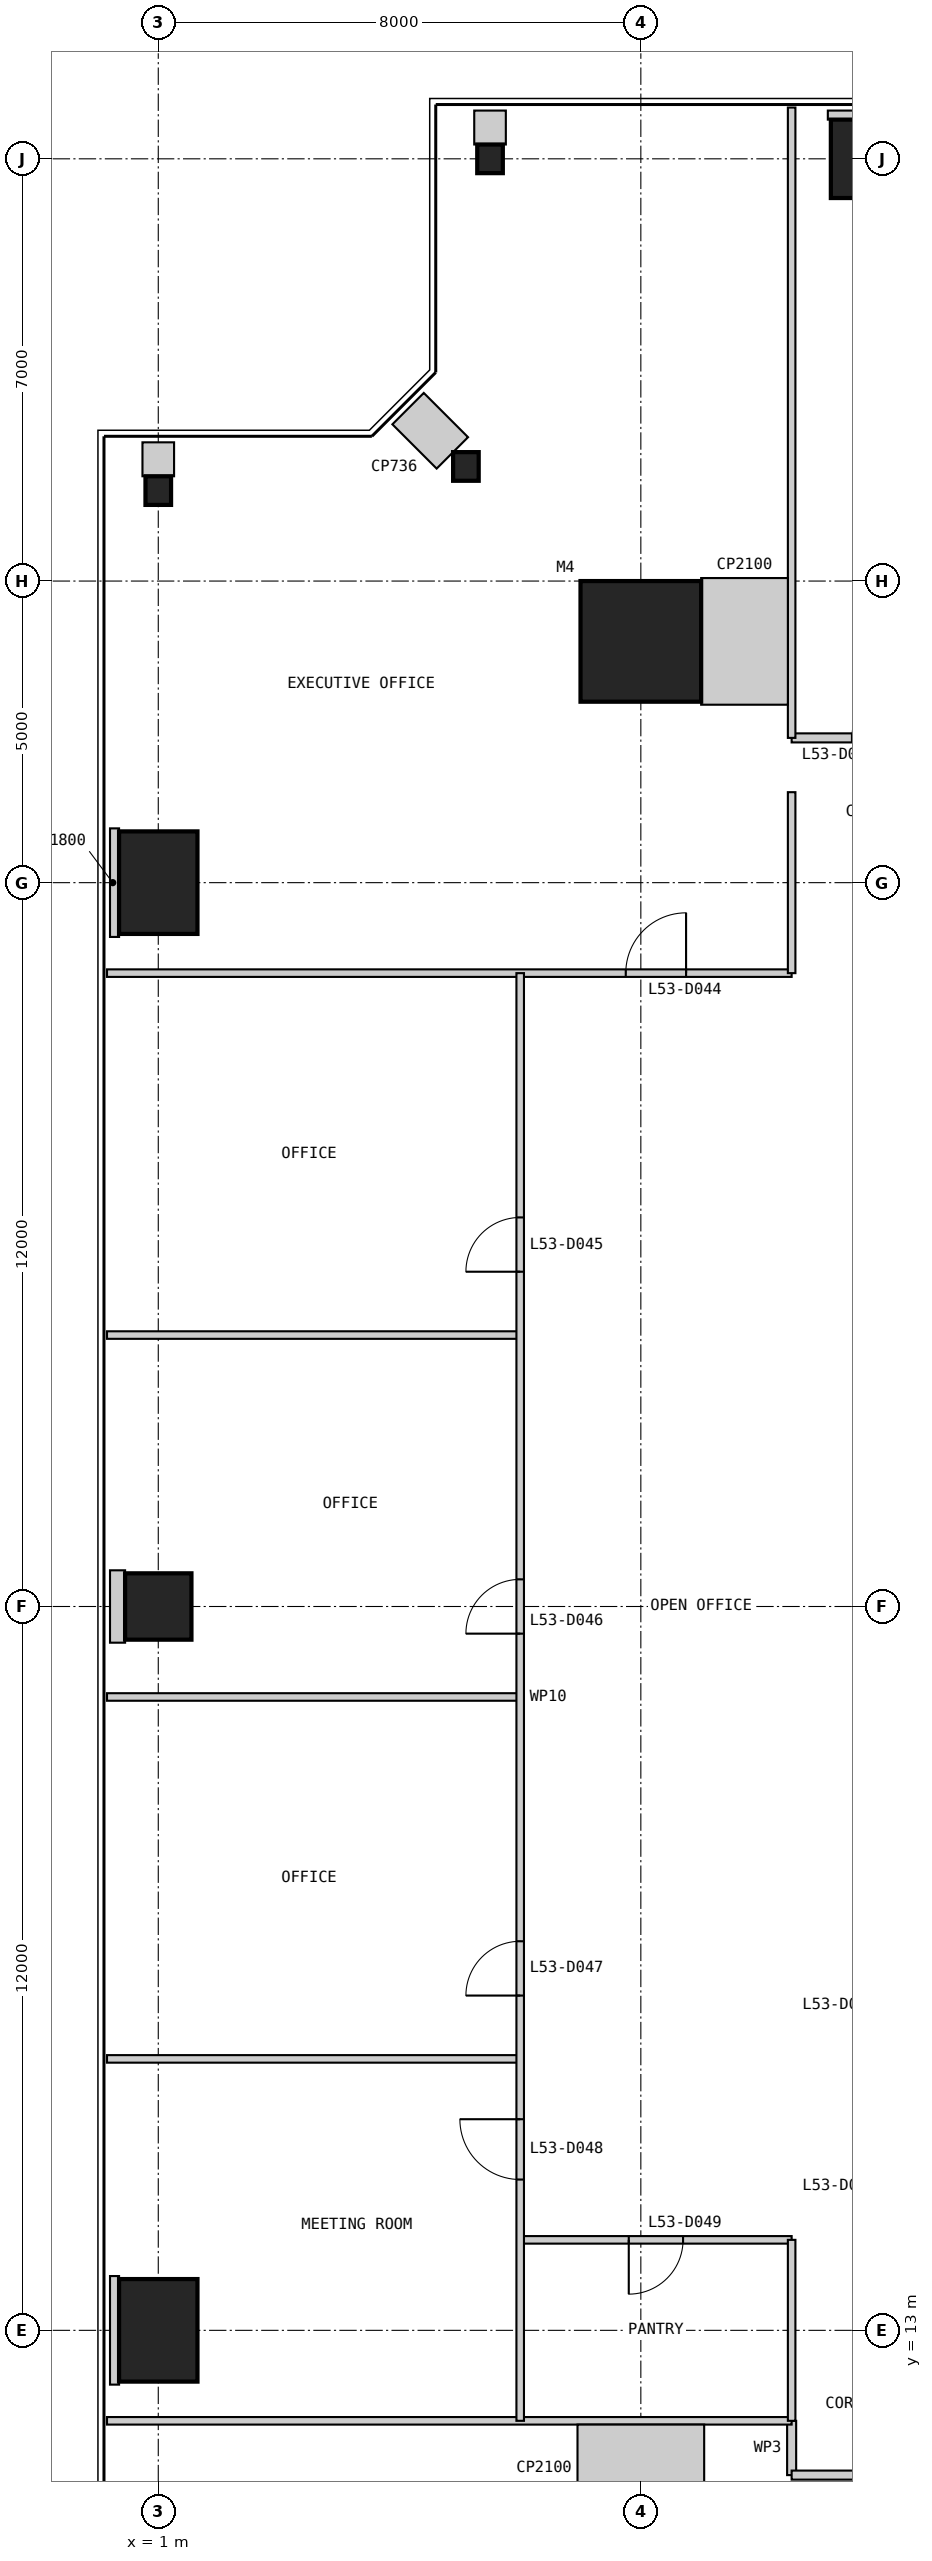
"""IFC4 building model, lengths in metres.
Left out: names, types, materials, properties, quantities, classifications, styles, units other than length and angle.
Written with IfcOpenShell. Run it as: python <this file> out.ifc"""

import sys

from ifc_helpers import new_model, si_unit, direction, frame, frame_2d, origin, origin_2d, place, context, subcontext, project, spatial, rectangle, i_section, extrude, element, fill, save


model = new_model("IFC4")
c1 = context("Model", 3, precision=1e-05, world=origin(), true_north=direction((0.0, 1.0)))
c2 = subcontext(c1, "Body", "Model", "MODEL_VIEW")
j1 = project(units=[si_unit("LENGTHUNIT", "METRE"), si_unit("PLANEANGLEUNIT", "RADIAN")], contexts=[c1])
p1 = place(None, origin())
s1 = spatial("IfcSite", under=j1, at=p1, CompositionType="ELEMENT")
p2 = place(p1, origin())
s2 = spatial("IfcBuilding", under=s1, at=p2, CompositionType="ELEMENT")
p3 = place(p2, frame((0.0, 0.0, 225.8)))
s3 = spatial("IfcBuildingStorey", under=s2, at=p3, CompositionType="ELEMENT", Elevation=225.8)
p4 = place(p3, frame((9.0, 41.0, 0.0), z_axis=(0.0, 0.0, 1.0), x_axis=(1.0, 0.0, 0.0)))
e1 = element("IfcColumn", 1, at=p4, inside=s3, PredefinedType="COLUMN", context=c2, shape_type="SweptSolid", body=[
    extrude(rectangle(XDim=2.0, YDim=2.0, at=origin_2d()), origin(), (0.0, 0.0, 1.0), 4.0),
])
p5 = place(p3, frame((13.0, 49.0, 0.0), z_axis=(0.0, 0.0, 1.0), x_axis=(1.0, 0.0, 0.0)))
e2 = element("IfcColumn", 2, at=p5, inside=s3, PredefinedType="COLUMN", context=c2, shape_type="SweptSolid", body=[
    extrude(rectangle(XDim=1.7, YDim=1.3, at=origin_2d()), origin(), (0.0, 0.0, 1.0), 4.0),
])
for number, where, z_axis, x_axis in (
    (3, (6.5, 49.0, 0.0), (0.0, 0.0, 1.0), (1.0, 0.0, 0.0)),
    (4, (6.1, 43.9, 0.0), (0.0, 0.0, 1.0), (1.0, 0.0, 0.0)),
    (5, (1.0, 43.5, 0.0), (0.0, 0.0, 1.0), (1.0, 0.0, 0.0)),
):
    element("IfcColumn", number, at=place(p3, frame(where, z_axis=z_axis, x_axis=x_axis)), inside=s3, PredefinedType="COLUMN", context=c2, shape_type="SweptSolid", body=[
        extrude(i_section(OverallWidth=0.424, OverallDepth=0.475, WebThickness=0.048, FlangeThickness=0.077, at=origin_2d()), origin(), (0.0, 0.0, 1.0), 4.0),
    ])
p6 = place(p3, frame((1.0, 37.0, 0.0), z_axis=(0.0, 0.0, 1.0), x_axis=(1.0, 0.0, 0.0)))
e6 = element("IfcColumn", 6, at=p6, inside=s3, PredefinedType="COLUMN", context=c2, shape_type="SweptSolid", body=[
    extrude(rectangle(XDim=1.3, YDim=1.7, at=origin_2d()), origin(), (0.0, 0.0, 1.0), 4.0),
])
p7 = place(p3, frame((1.0, 25.0, 0.0), z_axis=(0.0, 0.0, 1.0), x_axis=(1.0, 0.0, 0.0)))
e7 = element("IfcColumn", 7, at=p7, inside=s3, PredefinedType="COLUMN", context=c2, shape_type="SweptSolid", body=[
    extrude(rectangle(XDim=1.1, YDim=1.1, at=origin_2d()), origin(), (0.0, 0.0, 1.0), 4.0),
])
p8 = place(p3, frame((1.0, 13.0, 0.0), z_axis=(0.0, 0.0, 1.0), x_axis=(1.0, 0.0, 0.0)))
e8 = element("IfcColumn", 8, at=p8, inside=s3, PredefinedType="COLUMN", context=c2, shape_type="SweptSolid", body=[
    extrude(rectangle(XDim=1.3, YDim=1.7, at=origin_2d()), origin(), (0.0, 0.0, 1.0), 4.0),
])
p9 = place(p3, frame((11.5, 11.5, 0.0), z_axis=(0.0, 0.0, 1.0), x_axis=(0.0, -1.0, 0.0)))
e9 = element("IfcWall", 9, at=p9, inside=s3, PredefinedType="PARTITIONING", context=c2, shape_type="SweptSolid", body=[
    extrude(rectangle(XDim=0.9, YDim=0.15, at=frame_2d((0.45, 0.0))), origin(), (0.0, 0.0, 1.0), 3.85),
])
p10 = place(p3, frame((11.5, 10.6, 0.0), z_axis=(0.0, 0.0, 1.0), x_axis=(1.0, 0.0, 0.0)))
e10 = element("IfcWall", 10, at=p10, inside=s3, PredefinedType="PARTITIONING", context=c2, shape_type="SweptSolid", body=[
    extrude(rectangle(XDim=27.0, YDim=0.15, at=frame_2d((13.5, 0.0))), origin(), (0.0, 0.0, 1.0), 3.85),
])
p11 = place(p10, frame((3.25, 0.0, 0.0)))
e11 = element("IfcOpeningElement", 11, at=p11, cuts=e10, PredefinedType="OPENING", context=c2, shape_type="SweptSolid", body=[
    extrude(rectangle(XDim=1.0, YDim=2.2, at=frame_2d((0.5, 1.1))), frame((0.0, 0.085, 0.0), z_axis=(0.0, -1.0, 0.0), x_axis=(1.0, 0.0, 0.0)), (0.0, 0.0, 1.0), 0.17),
])
p12 = place(p10, frame((22.75, 0.0, 0.0)))
e12 = element("IfcOpeningElement", 12, at=p12, cuts=e10, PredefinedType="OPENING", context=c2, shape_type="SweptSolid", body=[
    extrude(rectangle(XDim=1.0, YDim=2.2, at=frame_2d((0.5, 1.1))), frame((0.0, 0.085, 0.0), z_axis=(0.0, -1.0, 0.0), x_axis=(1.0, 0.0, 0.0)), (0.0, 0.0, 1.0), 0.17),
])
p13 = place(p3, frame((0.15, 11.5, 0.0), z_axis=(0.0, 0.0, 1.0), x_axis=(1.0, 0.0, 0.0)))
e13 = element("IfcWall", 13, at=p13, inside=s3, PredefinedType="PARTITIONING", context=c2, shape_type="SweptSolid", body=[
    extrude(rectangle(XDim=11.35, YDim=0.125, at=frame_2d((5.675, 0.0))), origin(), (0.0, 0.0, 1.0), 3.85),
])
p14 = place(p3, frame((38.5, 39.4, 0.0), z_axis=(0.0, 0.0, 1.0), x_axis=(-1.0, 0.0, 0.0)))
e14 = element("IfcWall", 14, at=p14, inside=s3, PredefinedType="PARTITIONING", context=c2, shape_type="SweptSolid", body=[
    extrude(rectangle(XDim=27.0, YDim=0.15, at=frame_2d((13.5, 0.0))), origin(), (0.0, 0.0, 1.0), 3.85),
])
p15 = place(p14, frame((12.25, 0.0, 0.0)))
e15 = element("IfcOpeningElement", 15, at=p15, cuts=e14, PredefinedType="OPENING", context=c2, shape_type="SweptSolid", body=[
    extrude(rectangle(XDim=1.0, YDim=2.2, at=frame_2d((0.5, 1.1))), frame((0.0, 0.085, 0.0), z_axis=(0.0, -1.0, 0.0), x_axis=(1.0, 0.0, 0.0)), (0.0, 0.0, 1.0), 0.17),
])
p16 = place(p14, frame((19.75, 0.0, 0.0)))
e16 = element("IfcOpeningElement", 16, at=p16, cuts=e14, PredefinedType="OPENING", context=c2, shape_type="SweptSolid", body=[
    extrude(rectangle(XDim=1.0, YDim=2.2, at=frame_2d((0.5, 1.1))), frame((0.0, 0.085, 0.0), z_axis=(0.0, -1.0, 0.0), x_axis=(1.0, 0.0, 0.0)), (0.0, 0.0, 1.0), 0.17),
])
p17 = place(p14, frame((0.25, 0.0, 0.0)))
e17 = element("IfcOpeningElement", 17, at=p17, cuts=e14, PredefinedType="OPENING", context=c2, shape_type="SweptSolid", body=[
    extrude(rectangle(XDim=1.0, YDim=2.2, at=frame_2d((0.5, 1.1))), frame((0.0, 0.085, 0.0), z_axis=(0.0, -1.0, 0.0), x_axis=(1.0, 0.0, 0.0)), (0.0, 0.0, 1.0), 0.17),
])
p18 = place(p14, frame((10.75, 0.0, 0.0)))
e18 = element("IfcOpeningElement", 18, at=p18, cuts=e14, PredefinedType="OPENING", context=c2, shape_type="SweptSolid", body=[
    extrude(rectangle(XDim=1.0, YDim=2.2, at=frame_2d((0.5, 1.1))), frame((0.0, 0.085, 0.0), z_axis=(0.0, -1.0, 0.0), x_axis=(1.0, 0.0, 0.0)), (0.0, 0.0, 1.0), 0.17),
])
p19 = place(p14, frame((22.0, 0.0, 0.0)))
e19 = element("IfcOpeningElement", 19, at=p19, cuts=e14, PredefinedType="OPENING", context=c2, shape_type="SweptSolid", body=[
    extrude(rectangle(XDim=1.0, YDim=2.2, at=frame_2d((0.5, 1.1))), frame((0.0, 0.085, 0.0), z_axis=(0.0, -1.0, 0.0), x_axis=(1.0, 0.0, 0.0)), (0.0, 0.0, 1.0), 0.17),
])
p20 = place(p14, frame((25.0, 0.0, 0.0)))
e20 = element("IfcOpeningElement", 20, at=p20, cuts=e14, PredefinedType="OPENING", context=c2, shape_type="SweptSolid", body=[
    extrude(rectangle(XDim=1.0, YDim=2.2, at=frame_2d((0.5, 1.1))), frame((0.0, 0.085, 0.0), z_axis=(0.0, -1.0, 0.0), x_axis=(1.0, 0.0, 0.0)), (0.0, 0.0, 1.0), 0.17),
])
p21 = place(p3, frame((11.5, 49.85, 0.0), z_axis=(0.0, 0.0, 1.0), x_axis=(0.0, -1.0, 0.0)))
e21 = element("IfcWall", 21, at=p21, inside=s3, PredefinedType="PARTITIONING", context=c2, shape_type="SweptSolid", body=[
    extrude(rectangle(XDim=10.45, YDim=0.125, at=frame_2d((5.225, 0.0))), origin(), (0.0, 0.0, 1.0), 3.85),
])
p22 = place(p3, frame((0.15, 35.5, 0.0), z_axis=(0.0, 0.0, 1.0), x_axis=(1.0, 0.0, 0.0)))
e22 = element("IfcWall", 22, at=p22, inside=s3, PredefinedType="PARTITIONING", context=c2, shape_type="SweptSolid", body=[
    extrude(rectangle(XDim=11.35, YDim=0.125, at=frame_2d((5.675, 0.0))), origin(), (0.0, 0.0, 1.0), 3.85),
])
p23 = place(p22, frame((8.6, 0.0, 0.0)))
e23 = element("IfcOpeningElement", 23, at=p23, cuts=e22, PredefinedType="OPENING", context=c2, shape_type="SweptSolid", body=[
    extrude(rectangle(XDim=1.0, YDim=2.2, at=frame_2d((0.5, 1.1))), frame((0.0, 0.073, 0.0), z_axis=(0.0, -1.0, 0.0), x_axis=(1.0, 0.0, 0.0)), (0.0, 0.0, 1.0), 0.145),
])
for number, where, z_axis, x_axis in (
    (24, (0.15, 29.5, 0.0), (0.0, 0.0, 1.0), (1.0, 0.0, 0.0)),
    (25, (0.15, 23.5, 0.0), (0.0, 0.0, 1.0), (1.0, 0.0, 0.0)),
    (26, (0.15, 17.5, 0.0), (0.0, 0.0, 1.0), (1.0, 0.0, 0.0)),
):
    element("IfcWall", number, at=place(p3, frame(where, z_axis=z_axis, x_axis=x_axis)), inside=s3, PredefinedType="PARTITIONING", context=c2, shape_type="SweptSolid", body=[
        extrude(rectangle(XDim=6.85, YDim=0.125, at=frame_2d((3.425, 0.0))), origin(), (0.0, 0.0, 1.0), 3.85),
    ])
p24 = place(p3, frame((7.0, 14.5, 0.0), z_axis=(0.0, 0.0, 1.0), x_axis=(1.0, 0.0, 0.0)))
e27 = element("IfcWall", 27, at=p24, inside=s3, PredefinedType="PARTITIONING", context=c2, shape_type="SweptSolid", body=[
    extrude(rectangle(XDim=4.5, YDim=0.125, at=frame_2d((2.25, 0.0))), origin(), (0.0, 0.0, 1.0), 3.85),
])
p25 = place(p24, frame((1.8, 0.0, 0.0)))
e28 = element("IfcOpeningElement", 28, at=p25, cuts=e27, PredefinedType="OPENING", context=c2, shape_type="SweptSolid", body=[
    extrude(rectangle(XDim=0.9, YDim=2.2, at=frame_2d((0.45, 1.1))), frame((0.0, 0.073, 0.0), z_axis=(0.0, -1.0, 0.0), x_axis=(1.0, 0.0, 0.0)), (0.0, 0.0, 1.0), 0.145),
])
p26 = place(p3, frame((7.0, 35.5, 0.0), z_axis=(0.0, 0.0, 1.0), x_axis=(0.0, -1.0, 0.0)))
e29 = element("IfcWall", 29, at=p26, inside=s3, PredefinedType="PARTITIONING", context=c2, shape_type="SweptSolid", body=[
    extrude(rectangle(XDim=24.0, YDim=0.125, at=frame_2d((12.0, 0.0))), origin(), (0.0, 0.0, 1.0), 3.238),
])
p27 = place(p26, frame((4.05, 0.0, 0.0)))
e30 = element("IfcOpeningElement", 30, at=p27, cuts=e29, PredefinedType="OPENING", context=c2, shape_type="SweptSolid", body=[
    extrude(rectangle(XDim=0.9, YDim=2.2, at=frame_2d((0.45, 1.1))), frame((0.0, 0.073, 0.0), z_axis=(0.0, -1.0, 0.0), x_axis=(1.0, 0.0, 0.0)), (0.0, 0.0, 1.0), 0.145),
])
p28 = place(p26, frame((10.05, 0.0, 0.0)))
e31 = element("IfcOpeningElement", 31, at=p28, cuts=e29, PredefinedType="OPENING", context=c2, shape_type="SweptSolid", body=[
    extrude(rectangle(XDim=0.9, YDim=2.2, at=frame_2d((0.45, 1.1))), frame((0.0, 0.073, 0.0), z_axis=(0.0, -1.0, 0.0), x_axis=(1.0, 0.0, 0.0)), (0.0, 0.0, 1.0), 0.145),
])
p29 = place(p26, frame((16.05, 0.0, 0.0)))
e32 = element("IfcOpeningElement", 32, at=p29, cuts=e29, PredefinedType="OPENING", context=c2, shape_type="SweptSolid", body=[
    extrude(rectangle(XDim=0.9, YDim=2.2, at=frame_2d((0.45, 1.1))), frame((0.0, 0.073, 0.0), z_axis=(0.0, -1.0, 0.0), x_axis=(1.0, 0.0, 0.0)), (0.0, 0.0, 1.0), 0.145),
])
p30 = place(p26, frame((19.0, 0.0, 0.0)))
e33 = element("IfcOpeningElement", 33, at=p30, cuts=e29, PredefinedType="OPENING", context=c2, shape_type="SweptSolid", body=[
    extrude(rectangle(XDim=1.0, YDim=2.2, at=frame_2d((0.5, 1.1))), frame((0.0, 0.073, 0.0), z_axis=(0.0, -1.0, 0.0), x_axis=(1.0, 0.0, 0.0)), (0.0, 0.0, 1.0), 0.145),
])
for number, where, z_axis, x_axis in (
    (34, (11.5, 38.5, 0.0), (0.0, 0.0, 1.0), (0.0, -1.0, 0.0)),
    (35, (11.5, 14.5, 0.0), (0.0, 0.0, 1.0), (0.0, -1.0, 0.0)),
):
    element("IfcWall", number, at=place(p3, frame(where, z_axis=z_axis, x_axis=x_axis)), inside=s3, PredefinedType="PARTITIONING", context=c2, shape_type="SweptSolid", body=[
        extrude(rectangle(XDim=3.0, YDim=0.125, at=frame_2d((1.5, 0.0))), origin(), (0.0, 0.0, 1.0), 3.85),
    ])
p31 = place(p3, frame((9.0, 11.438, 0.0), z_axis=(0.0, 0.0, 1.0), x_axis=(0.0, -1.0, 0.0)))
e36 = element("IfcWall", 36, at=p31, inside=s3, PredefinedType="PARTITIONING", context=c2, shape_type="SweptSolid", body=[
    extrude(rectangle(XDim=1.438, YDim=2.1, at=frame_2d((0.719, 0.0))), origin(), (0.0, 0.0, 1.0), 3.85),
])
p32 = place(p3, frame((13.0, 49.8, 0.0), z_axis=(0.0, 0.0, 1.0), x_axis=(0.0, -1.0, 0.0)))
e37 = element("IfcWall", 37, at=p32, inside=s3, PredefinedType="PARTITIONING", context=c2, shape_type="SweptSolid", body=[
    extrude(rectangle(XDim=0.15, YDim=1.8, at=frame_2d((0.075, 0.0))), origin(), (0.0, 0.0, 1.0), 3.85),
])
p33 = place(p3, frame((11.438, 41.0, 0.0), z_axis=(0.0, 0.0, 1.0), x_axis=(-1.0, 0.0, 0.0)))
e38 = element("IfcWall", 38, at=p33, inside=s3, PredefinedType="PARTITIONING", context=c2, shape_type="SweptSolid", body=[
    extrude(rectangle(XDim=1.438, YDim=2.1, at=frame_2d((0.719, 0.0))), origin(), (0.0, 0.0, 1.0), 3.85),
])
p34 = place(p3, frame((6.5, 49.8, 0.0), z_axis=(0.0, 0.0, 1.0), x_axis=(0.0, -1.0, 0.0)))
e39 = element("IfcWall", 39, at=p34, inside=s3, PredefinedType="PARTITIONING", context=c2, shape_type="SweptSolid", body=[
    extrude(rectangle(XDim=0.562, YDim=0.524, at=frame_2d((0.281, 0.0))), origin(), (0.0, 0.0, 1.0), 3.85),
])
p35 = place(p3, frame((5.141, 44.859, 0.0), z_axis=(0.0, 0.0, 1.0), x_axis=(0.707106781187, -0.707106781187, 0.0)))
e40 = element("IfcWall", 40, at=p35, inside=s3, PredefinedType="PARTITIONING", context=c2, shape_type="SweptSolid", body=[
    extrude(rectangle(XDim=1.038, YDim=0.736, at=frame_2d((0.519, 0.0))), origin(), (0.0, 0.0, 1.0), 3.85),
])
p36 = place(p3, frame((1.0, 44.3, 0.0), z_axis=(0.0, 0.0, 1.0), x_axis=(0.0, -1.0, 0.0)))
e41 = element("IfcWall", 41, at=p36, inside=s3, PredefinedType="PARTITIONING", context=c2, shape_type="SweptSolid", body=[
    extrude(rectangle(XDim=0.562, YDim=0.524, at=frame_2d((0.281, 0.0))), origin(), (0.0, 0.0, 1.0), 3.85),
])
p37 = place(p3, frame((0.2, 37.0, 0.0), z_axis=(0.0, 0.0, 1.0), x_axis=(1.0, 0.0, 0.0)))
e42 = element("IfcWall", 42, at=p37, inside=s3, PredefinedType="PARTITIONING", context=c2, shape_type="SweptSolid", body=[
    extrude(rectangle(XDim=0.15, YDim=1.8, at=frame_2d((0.075, 0.0))), origin(), (0.0, 0.0, 1.0), 3.85),
])
p38 = place(p3, frame((0.2, 25.0, 0.0), z_axis=(0.0, 0.0, 1.0), x_axis=(1.0, 0.0, 0.0)))
e43 = element("IfcWall", 43, at=p38, inside=s3, PredefinedType="PARTITIONING", context=c2, shape_type="SweptSolid", body=[
    extrude(rectangle(XDim=0.25, YDim=1.2, at=frame_2d((0.125, 0.0))), origin(), (0.0, 0.0, 1.0), 3.85),
])
p39 = place(p3, frame((0.2, 13.0, 0.0), z_axis=(0.0, 0.0, 1.0), x_axis=(1.0, 0.0, 0.0)))
e44 = element("IfcWall", 44, at=p39, inside=s3, PredefinedType="PARTITIONING", context=c2, shape_type="SweptSolid", body=[
    extrude(rectangle(XDim=0.15, YDim=1.8, at=frame_2d((0.075, 0.0))), origin(), (0.0, 0.0, 1.0), 3.85),
])
p40 = place(p23, origin())
e45 = element("IfcDoor", 45, at=p40, inside=s3, OperationType="SINGLE_SWING_RIGHT", PredefinedType="DOOR", context=c2, shape_type="SweptSolid", body=[
    extrude(rectangle(XDim=1.0, YDim=2.2, at=frame_2d((0.5, 1.1))), frame((0.0, 0.025, 0.0), z_axis=(0.0, -1.0, 0.0), x_axis=(1.0, 0.0, 0.0)), (0.0, 0.0, 1.0), 0.05),
])
fill(e23, e45)
p41 = place(p27, frame((0.9, 0.0, 0.0), z_axis=(0.0, 0.0, 1.0), x_axis=(-1.0, 0.0, 0.0)))
e46 = element("IfcDoor", 46, at=p41, inside=s3, OperationType="SINGLE_SWING_LEFT", PredefinedType="DOOR", context=c2, shape_type="SweptSolid", body=[
    extrude(rectangle(XDim=0.9, YDim=2.2, at=frame_2d((0.45, 1.1))), frame((0.0, 0.025, 0.0), z_axis=(0.0, -1.0, 0.0), x_axis=(1.0, 0.0, 0.0)), (0.0, 0.0, 1.0), 0.05),
])
fill(e30, e46)
p42 = place(p28, frame((0.9, 0.0, 0.0), z_axis=(0.0, 0.0, 1.0), x_axis=(-1.0, 0.0, 0.0)))
e47 = element("IfcDoor", 47, at=p42, inside=s3, OperationType="SINGLE_SWING_LEFT", PredefinedType="DOOR", context=c2, shape_type="SweptSolid", body=[
    extrude(rectangle(XDim=0.9, YDim=2.2, at=frame_2d((0.45, 1.1))), frame((0.0, 0.025, 0.0), z_axis=(0.0, -1.0, 0.0), x_axis=(1.0, 0.0, 0.0)), (0.0, 0.0, 1.0), 0.05),
])
fill(e31, e47)
p43 = place(p29, frame((0.9, 0.0, 0.0), z_axis=(0.0, 0.0, 1.0), x_axis=(-1.0, 0.0, 0.0)))
e48 = element("IfcDoor", 48, at=p43, inside=s3, OperationType="SINGLE_SWING_LEFT", PredefinedType="DOOR", context=c2, shape_type="SweptSolid", body=[
    extrude(rectangle(XDim=0.9, YDim=2.2, at=frame_2d((0.45, 1.1))), frame((0.0, 0.025, 0.0), z_axis=(0.0, -1.0, 0.0), x_axis=(1.0, 0.0, 0.0)), (0.0, 0.0, 1.0), 0.05),
])
fill(e32, e48)
p44 = place(p30, frame((1.0, 0.0, 0.0), z_axis=(0.0, 0.0, 1.0), x_axis=(-1.0, 0.0, 0.0)))
e49 = element("IfcDoor", 49, at=p44, inside=s3, OperationType="SINGLE_SWING_RIGHT", PredefinedType="DOOR", context=c2, shape_type="SweptSolid", body=[
    extrude(rectangle(XDim=1.0, YDim=2.2, at=frame_2d((0.5, 1.1))), frame((0.0, 0.025, 0.0), z_axis=(0.0, -1.0, 0.0), x_axis=(1.0, 0.0, 0.0)), (0.0, 0.0, 1.0), 0.05),
])
fill(e33, e49)
p45 = place(p25, frame((0.9, 0.0, 0.0), z_axis=(0.0, 0.0, 1.0), x_axis=(-1.0, 0.0, 0.0)))
e50 = element("IfcDoor", 50, at=p45, inside=s3, OperationType="SINGLE_SWING_RIGHT", PredefinedType="DOOR", context=c2, shape_type="SweptSolid", body=[
    extrude(rectangle(XDim=0.9, YDim=2.2, at=frame_2d((0.45, 1.1))), frame((0.0, 0.025, 0.0), z_axis=(0.0, -1.0, 0.0), x_axis=(1.0, 0.0, 0.0)), (0.0, 0.0, 1.0), 0.05),
])
fill(e28, e50)
save(model, sys.argv[1])
